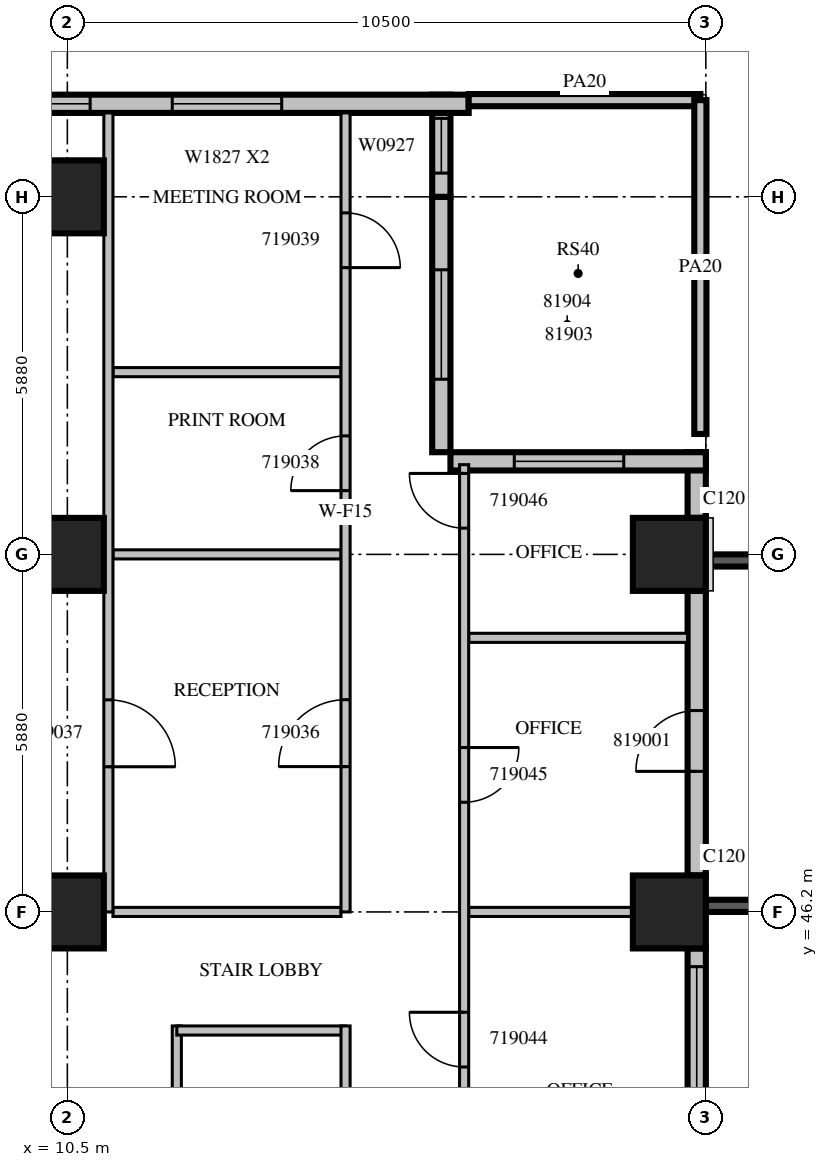
"""IFC4 building model, lengths in metres.
Left out: names, types, materials, properties, quantities, classifications, styles, units other than length and angle.
Written with IfcOpenShell. Run it as: python <this file> out.ifc"""

import sys

from ifc_helpers import new_model, si_unit, direction, frame, frame_2d, origin, origin_2d, place, context, subcontext, project, spatial, rectangle, extrude, source, transform, mapped, element, fill, save


model = new_model("IFC4")
c1 = context("Model", 3, precision=1e-05, world=origin(), true_north=direction((0.0, 1.0)))
c2 = subcontext(c1, "Body", "Model", "MODEL_VIEW")
j1 = project(units=[si_unit("LENGTHUNIT", "METRE"), si_unit("PLANEANGLEUNIT", "RADIAN")], contexts=[c1])
p1 = place(None, origin())
s1 = spatial("IfcSite", under=j1, at=p1, CompositionType="ELEMENT")
p2 = place(p1, origin())
s2 = spatial("IfcBuilding", under=s1, at=p2, CompositionType="ELEMENT")
p3 = place(p2, frame((0.0, 0.0, 90.9)))
s3 = spatial("IfcBuildingStorey", under=s2, at=p3, CompositionType="ELEMENT", Elevation=90.9)
m1 = source(origin(), c2, "Body", "SweptSolid", [
    extrude(rectangle(XDim=1.2, YDim=1.2, at=origin_2d()), origin(), (0.0, 0.0, 1.0), 4.2),
])
for number, where, z_axis, x_axis in (
    (1, (10.5, 46.2, 0.0), (0.0, 0.0, 1.0), (1.0, 0.0, 0.0)),
    (2, (20.4, 46.2, 0.0), (0.0, 0.0, 1.0), (1.0, 0.0, 0.0)),
    (3, (10.5, 52.08, 0.0), (0.0, 0.0, 1.0), (1.0, 0.0, 0.0)),
    (4, (20.4, 52.08, 0.0), (0.0, 0.0, 1.0), (1.0, 0.0, 0.0)),
    (5, (10.5, 57.96, 0.0), (0.0, 0.0, 1.0), (1.0, 0.0, 0.0)),
):
    element("IfcColumn", number, at=place(p3, frame(where, z_axis=z_axis, x_axis=x_axis)), inside=s3, PredefinedType="COLUMN", context=c2, shape_type="MappedRepresentation", body=[
        mapped(m1, transform((0.0, 0.0, 0.0), scale=1.0)),
    ])
m2 = source(origin(), c2, "Body", "SweptSolid", [
    extrude(rectangle(XDim=3.9, YDim=0.2, at=frame_2d((1.95, 0.0))), origin(), (0.0, 0.0, 1.0), 3.8),
])
p4 = place(p3, frame((21.0, 46.3, 0.0), z_axis=(0.0, 0.0, 1.0), x_axis=(1.0, 0.0, 0.0)))
e6 = element("IfcWall", 6, at=p4, inside=s3, PredefinedType="SOLIDWALL", context=c2, shape_type="MappedRepresentation", body=[
    mapped(m2, transform((0.0, 0.0, 0.0), scale=1.0)),
])
m3 = source(origin(), c2, "Body", "SweptSolid", [
    extrude(rectangle(XDim=2.4, YDim=2.7, at=frame_2d((1.2, 1.35))), frame((0.0, 0.11, 0.0), z_axis=(0.0, -1.0, 0.0), x_axis=(1.0, 0.0, 0.0)), (0.0, 0.0, 1.0), 0.22),
])
p5 = place(p4, frame((0.75, 0.0, 0.6)))
e7 = element("IfcOpeningElement", 7, at=p5, cuts=e6, PredefinedType="OPENING", context=c2, shape_type="MappedRepresentation", body=[
    mapped(m3, transform((0.0, 0.0, 0.0), scale=1.0)),
])
p6 = place(p3, frame((21.0, 51.98, 0.0), z_axis=(0.0, 0.0, 1.0), x_axis=(1.0, 0.0, 0.0)))
e8 = element("IfcWall", 8, at=p6, inside=s3, PredefinedType="SOLIDWALL", context=c2, shape_type="MappedRepresentation", body=[
    mapped(m2, transform((0.0, 0.0, 0.0), scale=1.0)),
])
p7 = place(p6, frame((0.75, 0.0, 0.6)))
e9 = element("IfcOpeningElement", 9, at=p7, cuts=e8, PredefinedType="OPENING", context=c2, shape_type="MappedRepresentation", body=[
    mapped(m3, transform((0.0, 0.0, 0.0), scale=1.0)),
])
m4 = source(origin(), c2, "Body", "SweptSolid", [
    extrude(rectangle(XDim=7.2, YDim=0.3, at=frame_2d((3.6, 0.0))), origin(), (0.0, 0.0, 1.0), 3.8),
])
p8 = place(p3, frame((20.85, 38.4, 0.0), z_axis=(0.0, 0.0, 1.0), x_axis=(0.0, 1.0, 0.0)))
e10 = element("IfcWall", 10, at=p8, inside=s3, PredefinedType="STANDARD", context=c2, shape_type="MappedRepresentation", body=[
    mapped(m4, transform((0.0, 0.0, 0.0), scale=1.0)),
])
m5 = source(origin(), c2, "Body", "SweptSolid", [
    extrude(rectangle(XDim=2.4, YDim=2.7, at=frame_2d((1.2, 1.35))), frame((0.0, 0.16, 0.0), z_axis=(0.0, -1.0, 0.0), x_axis=(1.0, 0.0, 0.0)), (0.0, 0.0, 1.0), 0.32),
])
p9 = place(p8, frame((0.3, 0.0, 0.6)))
e11 = element("IfcOpeningElement", 11, at=p9, cuts=e10, PredefinedType="OPENING", context=c2, shape_type="MappedRepresentation", body=[
    mapped(m5, transform((0.0, 0.0, 0.0), scale=1.0)),
])
p10 = place(p8, frame((4.5, 0.0, 0.6)))
e12 = element("IfcOpeningElement", 12, at=p10, cuts=e10, PredefinedType="OPENING", context=c2, shape_type="MappedRepresentation", body=[
    mapped(m5, transform((0.0, 0.0, 0.0), scale=1.0)),
])
m6 = source(origin(), c2, "Body", "SweptSolid", [
    extrude(rectangle(XDim=4.68, YDim=0.3, at=frame_2d((2.34, 0.0))), origin(), (0.0, 0.0, 1.0), 3.8),
])
p11 = place(p3, frame((20.85, 46.8, 0.0), z_axis=(0.0, 0.0, 1.0), x_axis=(0.0, 1.0, 0.0)))
e13 = element("IfcWall", 13, at=p11, inside=s3, PredefinedType="STANDARD", context=c2, shape_type="MappedRepresentation", body=[
    mapped(m6, transform((0.0, 0.0, 0.0), scale=1.0)),
])
m7 = source(origin(), c2, "Body", "SweptSolid", [
    extrude(rectangle(XDim=1.0, YDim=2.1, at=frame_2d((0.5, 1.05))), frame((0.0, 0.16, 0.0), z_axis=(0.0, -1.0, 0.0), x_axis=(1.0, 0.0, 0.0)), (0.0, 0.0, 1.0), 0.32),
])
p12 = place(p11, frame((1.712, 0.0, 0.0)))
e14 = element("IfcOpeningElement", 14, at=p12, cuts=e13, PredefinedType="OPENING", context=c2, shape_type="MappedRepresentation", body=[
    mapped(m7, transform((0.0, 0.0, 0.0), scale=1.0)),
])
m8 = source(origin(), c2, "Body", "SweptSolid", [
    extrude(rectangle(XDim=1.08, YDim=0.3, at=frame_2d((0.54, 0.0))), origin(), (0.0, 0.0, 1.0), 3.8),
])
p13 = place(p3, frame((20.85, 52.68, 0.0), z_axis=(0.0, 0.0, 1.0), x_axis=(0.0, 1.0, 0.0)))
e15 = element("IfcWall", 15, at=p13, inside=s3, PredefinedType="STANDARD", context=c2, shape_type="MappedRepresentation", body=[
    mapped(m8, transform((0.0, 0.0, 0.0), scale=1.0)),
])
m9 = source(origin(), c2, "Body", "SweptSolid", [
    extrude(rectangle(XDim=4.2, YDim=0.3, at=frame_2d((2.1, 0.0))), origin(), (0.0, 0.0, 1.0), 3.8),
])
p14 = place(p3, frame((21.0, 53.61, 0.0), z_axis=(0.0, 0.0, 1.0), x_axis=(-1.0, 0.0, 0.0)))
e16 = element("IfcWall", 16, at=p14, inside=s3, PredefinedType="STANDARD", context=c2, shape_type="MappedRepresentation", body=[
    mapped(m9, transform((0.0, 0.0, 0.0), scale=1.0)),
])
m10 = source(origin(), c2, "Body", "SweptSolid", [
    extrude(rectangle(XDim=1.8, YDim=2.4, at=frame_2d((0.9, 1.2))), frame((0.0, 0.16, 0.0), z_axis=(0.0, -1.0, 0.0), x_axis=(1.0, 0.0, 0.0)), (0.0, 0.0, 1.0), 0.32),
])
p15 = place(p14, frame((1.35, 0.0, 0.0)))
e17 = element("IfcOpeningElement", 17, at=p15, cuts=e16, PredefinedType="OPENING", context=c2, shape_type="MappedRepresentation", body=[
    mapped(m10, transform((0.0, 0.0, 0.0), scale=1.0)),
])
p16 = place(p3, frame((16.65, 53.76, 0.0), z_axis=(0.0, 0.0, 1.0), x_axis=(0.0, 1.0, 0.0)))
e18 = element("IfcWall", 18, at=p16, inside=s3, PredefinedType="STANDARD", context=c2, shape_type="MappedRepresentation", body=[
    mapped(m9, transform((0.0, 0.0, 0.0), scale=1.0)),
])
p17 = place(p16, frame((1.2, 0.0, 0.0)))
e19 = element("IfcOpeningElement", 19, at=p17, cuts=e18, PredefinedType="OPENING", context=c2, shape_type="MappedRepresentation", body=[
    mapped(m10, transform((0.0, 0.0, 0.0), scale=1.0)),
])
m11 = source(origin(), c2, "Body", "SweptSolid", [
    extrude(rectangle(XDim=1.68, YDim=0.3, at=frame_2d((0.84, 0.0))), origin(), (0.0, 0.0, 1.0), 3.8),
])
p18 = place(p3, frame((16.65, 57.96, 0.0), z_axis=(0.0, 0.0, 1.0), x_axis=(0.0, 1.0, 0.0)))
e20 = element("IfcWall", 20, at=p18, inside=s3, PredefinedType="STANDARD", context=c2, shape_type="MappedRepresentation", body=[
    mapped(m11, transform((0.0, 0.0, 0.0), scale=1.0)),
])
m12 = source(origin(), c2, "Body", "SweptSolid", [
    extrude(rectangle(XDim=0.9, YDim=2.7, at=frame_2d((0.45, 1.35))), frame((0.0, 0.16, 0.0), z_axis=(0.0, -1.0, 0.0), x_axis=(1.0, 0.0, 0.0)), (0.0, 0.0, 1.0), 0.32),
])
p19 = place(p18, frame((0.39, 0.0, 0.6)))
e21 = element("IfcOpeningElement", 21, at=p19, cuts=e20, PredefinedType="OPENING", context=c2, shape_type="MappedRepresentation", body=[
    mapped(m12, transform((0.0, 0.0, 0.0), scale=1.0)),
])
m13 = source(origin(), c2, "Body", "SweptSolid", [
    extrude(rectangle(XDim=8.7, YDim=0.3, at=frame_2d((4.35, 0.0))), origin(), (0.0, 0.0, 1.0), 3.8),
])
p20 = place(p3, frame((17.1, 59.49, 0.0), z_axis=(0.0, 0.0, 1.0), x_axis=(-1.0, 0.0, 0.0)))
e22 = element("IfcWall", 22, at=p20, inside=s3, PredefinedType="STANDARD", context=c2, shape_type="MappedRepresentation", body=[
    mapped(m13, transform((0.0, 0.0, 0.0), scale=1.0)),
])
m14 = source(origin(), c2, "Body", "SweptSolid", [
    extrude(rectangle(XDim=1.8, YDim=2.7, at=frame_2d((0.9, 1.35))), frame((0.0, 0.16, 0.0), z_axis=(0.0, -1.0, 0.0), x_axis=(1.0, 0.0, 0.0)), (0.0, 0.0, 1.0), 0.32),
])
p21 = place(p20, frame((3.075, 0.0, 0.6)))
e23 = element("IfcOpeningElement", 23, at=p21, cuts=e22, PredefinedType="OPENING", context=c2, shape_type="MappedRepresentation", body=[
    mapped(m14, transform((0.0, 0.0, 0.0), scale=1.0)),
])
p22 = place(p20, frame((6.225, 0.0, 0.6)))
e24 = element("IfcOpeningElement", 24, at=p22, cuts=e22, PredefinedType="OPENING", context=c2, shape_type="MappedRepresentation", body=[
    mapped(m14, transform((0.0, 0.0, 0.0), scale=1.0)),
])
m15 = source(origin(), c2, "Body", "SweptSolid", [
    extrude(rectangle(XDim=3.81, YDim=0.2, at=frame_2d((1.905, 0.0))), origin(), (0.0, 0.0, 1.0), 1.1),
])
p23 = place(p3, frame((17.1, 59.55, 0.0), z_axis=(0.0, 0.0, 1.0), x_axis=(1.0, 0.0, 0.0)))
e25 = element("IfcWall", 25, at=p23, inside=s3, PredefinedType="PARAPET", context=c2, shape_type="MappedRepresentation", body=[
    mapped(m15, transform((0.0, 0.0, 0.0), scale=1.0)),
])
m16 = source(origin(), c2, "Body", "SweptSolid", [
    extrude(rectangle(XDim=5.49, YDim=0.2, at=frame_2d((2.745, 0.0))), origin(), (0.0, 0.0, 1.0), 1.1),
])
p24 = place(p3, frame((20.91, 59.55, 0.0), z_axis=(0.0, 0.0, 1.0), x_axis=(0.0, -1.0, 0.0)))
e26 = element("IfcWall", 26, at=p24, inside=s3, PredefinedType="PARAPET", context=c2, shape_type="MappedRepresentation", body=[
    mapped(m16, transform((0.0, 0.0, 0.0), scale=1.0)),
])
m17 = source(origin(), c2, "Body", "SweptSolid", [
    extrude(rectangle(XDim=6.45, YDim=0.15, at=frame_2d((3.225, 0.0))), origin(), (0.0, 0.0, 1.0), 3.8),
])
p25 = place(p3, frame((12.3, 44.325, 0.0), z_axis=(0.0, 0.0, 1.0), x_axis=(0.0, -1.0, 0.0)))
e27 = element("IfcWall", 27, at=p25, inside=s3, PredefinedType="PARTITIONING", context=c2, shape_type="MappedRepresentation", body=[
    mapped(m17, transform((0.0, 0.0, 0.0), scale=1.0)),
])
m18 = source(origin(), c2, "Body", "SweptSolid", [
    extrude(rectangle(XDim=2.775, YDim=0.15, at=frame_2d((1.387, 0.0))), origin(), (0.0, 0.0, 1.0), 3.8),
])
p26 = place(p3, frame((15.075, 44.25, 0.0), z_axis=(0.0, 0.0, 1.0), x_axis=(-1.0, 0.0, 0.0)))
e28 = element("IfcWall", 28, at=p26, inside=s3, PredefinedType="PARTITIONING", context=c2, shape_type="MappedRepresentation", body=[
    mapped(m18, transform((0.0, 0.0, 0.0), scale=1.0)),
])
p27 = place(p3, frame((15.075, 37.875, 0.0), z_axis=(0.0, 0.0, 1.0), x_axis=(0.0, 1.0, 0.0)))
e29 = element("IfcWall", 29, at=p27, inside=s3, PredefinedType="PARTITIONING", context=c2, shape_type="MappedRepresentation", body=[
    mapped(m17, transform((0.0, 0.0, 0.0), scale=1.0)),
])
m19 = source(origin(), c2, "Body", "SweptSolid", [
    extrude(rectangle(XDim=0.9, YDim=2.1, at=frame_2d((0.45, 1.05))), frame((0.0, 0.085, 0.0), z_axis=(0.0, -1.0, 0.0), x_axis=(1.0, 0.0, 0.0)), (0.0, 0.0, 1.0), 0.17),
])
p28 = place(p27, frame((2.737, 0.0, 0.0)))
e30 = element("IfcOpeningElement", 30, at=p28, cuts=e29, PredefinedType="OPENING", context=c2, shape_type="MappedRepresentation", body=[
    mapped(m19, transform((0.0, 0.0, 0.0), scale=1.0)),
])
m20 = source(origin(), c2, "Body", "SweptSolid", [
    extrude(rectangle(XDim=3.75, YDim=0.15, at=frame_2d((1.875, 0.0))), origin(), (0.0, 0.0, 1.0), 3.8),
])
for number, where, z_axis, x_axis in (
    (31, (15.0, 52.08, 0.0), (0.0, 0.0, 1.0), (-1.0, 0.0, 0.0)),
    (32, (15.0, 55.077, 0.0), (0.0, 0.0, 1.0), (-1.0, 0.0, 0.0)),
    (33, (15.0, 46.2, 0.0), (0.0, 0.0, 1.0), (-1.0, 0.0, 0.0)),
):
    element("IfcWall", number, at=place(p3, frame(where, z_axis=z_axis, x_axis=x_axis)), inside=s3, PredefinedType="PARTITIONING", context=c2, shape_type="MappedRepresentation", body=[
        mapped(m20, transform((0.0, 0.0, 0.0), scale=1.0)),
    ])
m21 = source(origin(), c2, "Body", "SweptSolid", [
    extrude(rectangle(XDim=13.14, YDim=0.15, at=frame_2d((6.57, 0.0))), origin(), (0.0, 0.0, 1.0), 3.8),
])
p29 = place(p3, frame((11.175, 46.2, 0.0), z_axis=(0.0, 0.0, 1.0), x_axis=(0.0, 1.0, 0.0)))
e34 = element("IfcWall", 34, at=p29, inside=s3, PredefinedType="PARTITIONING", context=c2, shape_type="MappedRepresentation", body=[
    mapped(m21, transform((0.0, 0.0, 0.0), scale=1.0)),
])
m22 = source(origin(), c2, "Body", "SweptSolid", [
    extrude(rectangle(XDim=1.1, YDim=2.1, at=frame_2d((0.55, 1.05))), frame((0.0, 0.085, 0.0), z_axis=(0.0, -1.0, 0.0), x_axis=(1.0, 0.0, 0.0)), (0.0, 0.0, 1.0), 0.17),
])
p30 = place(p29, frame((2.388, 0.0, 0.0)))
e35 = element("IfcOpeningElement", 35, at=p30, cuts=e34, PredefinedType="OPENING", context=c2, shape_type="MappedRepresentation", body=[
    mapped(m22, transform((0.0, 0.0, 0.0), scale=1.0)),
])
m23 = source(origin(), c2, "Body", "SweptSolid", [
    extrude(rectangle(XDim=3.6, YDim=0.15, at=frame_2d((1.8, 0.0))), origin(), (0.0, 0.0, 1.0), 3.8),
])
p31 = place(p3, frame((17.1, 50.708, 0.0), z_axis=(0.0, 0.0, 1.0), x_axis=(1.0, 0.0, 0.0)))
e36 = element("IfcWall", 36, at=p31, inside=s3, PredefinedType="PARTITIONING", context=c2, shape_type="MappedRepresentation", body=[
    mapped(m23, transform((0.0, 0.0, 0.0), scale=1.0)),
])
m24 = source(origin(), c2, "Body", "SweptSolid", [
    extrude(rectangle(XDim=2.701, YDim=0.15, at=frame_2d((1.351, 0.0))), origin(), (0.0, 0.0, 1.0), 3.8),
])
p32 = place(p3, frame((19.801, 46.2, 0.0), z_axis=(0.0, 0.0, 1.0), x_axis=(-1.0, 0.0, 0.0)))
e37 = element("IfcWall", 37, at=p32, inside=s3, PredefinedType="PARTITIONING", context=c2, shape_type="MappedRepresentation", body=[
    mapped(m24, transform((0.0, 0.0, 0.0), scale=1.0)),
])
p33 = place(p3, frame((15.075, 46.2, 0.0), z_axis=(0.0, 0.0, 1.0), x_axis=(0.0, 1.0, 0.0)))
e38 = element("IfcWall", 38, at=p33, inside=s3, PredefinedType="PARTITIONING", context=c2, shape_type="MappedRepresentation", body=[
    mapped(m21, transform((0.0, 0.0, 0.0), scale=1.0)),
])
p34 = place(p33, frame((2.39, 0.0, 0.0)))
e39 = element("IfcOpeningElement", 39, at=p34, cuts=e38, PredefinedType="OPENING", context=c2, shape_type="MappedRepresentation", body=[
    mapped(m22, transform((0.0, 0.0, 0.0), scale=1.0)),
])
p35 = place(p33, frame((6.928, 0.0, 0.0)))
e40 = element("IfcOpeningElement", 40, at=p35, cuts=e38, PredefinedType="OPENING", context=c2, shape_type="MappedRepresentation", body=[
    mapped(m19, transform((0.0, 0.0, 0.0), scale=1.0)),
])
p36 = place(p33, frame((10.596, 0.0, 0.0)))
e41 = element("IfcOpeningElement", 41, at=p36, cuts=e38, PredefinedType="OPENING", context=c2, shape_type="MappedRepresentation", body=[
    mapped(m19, transform((0.0, 0.0, 0.0), scale=1.0)),
])
p37 = place(p3, frame((17.025, 53.555, 0.0), z_axis=(0.0, 0.0, 1.0), x_axis=(0.0, -1.0, 0.0)))
e42 = element("IfcWall", 42, at=p37, inside=s3, PredefinedType="PARTITIONING", context=c2, shape_type="SweptSolid", body=[
    extrude(rectangle(XDim=24.155, YDim=0.15, at=frame_2d((12.078, 0.0))), origin(), (0.0, 0.0, 1.0), 3.8),
])
m25 = source(origin(), c2, "Body", "SweptSolid", [
    extrude(rectangle(XDim=1.0, YDim=2.1, at=frame_2d((0.5, 1.05))), frame((0.0, 0.085, 0.0), z_axis=(0.0, -1.0, 0.0), x_axis=(1.0, 0.0, 0.0)), (0.0, 0.0, 1.0), 0.17),
])
p38 = place(p37, frame((21.798, 0.0, 0.0)))
e43 = element("IfcOpeningElement", 43, at=p38, cuts=e42, PredefinedType="OPENING", context=c2, shape_type="MappedRepresentation", body=[
    mapped(m25, transform((0.0, 0.0, 0.0), scale=1.0)),
])
p39 = place(p37, frame((18.486, 0.0, 0.0)))
e44 = element("IfcOpeningElement", 44, at=p39, cuts=e42, PredefinedType="OPENING", context=c2, shape_type="MappedRepresentation", body=[
    mapped(m25, transform((0.0, 0.0, 0.0), scale=1.0)),
])
p40 = place(p37, frame((16.143, 0.0, 0.0)))
e45 = element("IfcOpeningElement", 45, at=p40, cuts=e42, PredefinedType="OPENING", context=c2, shape_type="MappedRepresentation", body=[
    mapped(m25, transform((0.0, 0.0, 0.0), scale=1.0)),
])
p41 = place(p37, frame((13.205, 0.0, 0.0)))
e46 = element("IfcOpeningElement", 46, at=p41, cuts=e42, PredefinedType="OPENING", context=c2, shape_type="MappedRepresentation", body=[
    mapped(m19, transform((0.0, 0.0, 0.0), scale=1.0)),
])
p42 = place(p37, frame((9.005, 0.0, 0.0)))
e47 = element("IfcOpeningElement", 47, at=p42, cuts=e42, PredefinedType="OPENING", context=c2, shape_type="MappedRepresentation", body=[
    mapped(m19, transform((0.0, 0.0, 0.0), scale=1.0)),
])
p43 = place(p37, frame((4.651, 0.0, 0.0)))
e48 = element("IfcOpeningElement", 48, at=p43, cuts=e42, PredefinedType="OPENING", context=c2, shape_type="MappedRepresentation", body=[
    mapped(m19, transform((0.0, 0.0, 0.0), scale=1.0)),
])
p44 = place(p37, frame((0.144, 0.0, 0.0)))
e49 = element("IfcOpeningElement", 49, at=p44, cuts=e42, PredefinedType="OPENING", context=c2, shape_type="MappedRepresentation", body=[
    mapped(m19, transform((0.0, 0.0, 0.0), scale=1.0)),
])
m26 = source(origin(), c2, "Body", "SweptSolid", [
    extrude(rectangle(XDim=2.4, YDim=2.7, at=frame_2d((1.2, 1.35))), frame((0.0, 0.03, 0.0), z_axis=(0.0, -1.0, 0.0), x_axis=(1.0, 0.0, 0.0)), (0.0, 0.0, 1.0), 0.06),
])
p45 = place(p10, origin())
e50 = element("IfcWindow", 50, at=p45, inside=s3, PartitioningType="SINGLE_PANEL", PredefinedType="WINDOW", context=c2, shape_type="MappedRepresentation", body=[
    mapped(m26, transform((0.0, 0.0, 0.0), scale=1.0)),
])
fill(e12, e50)
m27 = source(origin(), c2, "Body", "SweptSolid", [
    extrude(rectangle(XDim=1.8, YDim=2.4, at=frame_2d((0.9, 1.2))), frame((0.0, 0.025, 0.0), z_axis=(0.0, -1.0, 0.0), x_axis=(1.0, 0.0, 0.0)), (0.0, 0.0, 1.0), 0.05),
])
p46 = place(p15, origin())
e51 = element("IfcDoor", 51, at=p46, inside=s3, OperationType="SLIDING_TO_LEFT", PredefinedType="DOOR", context=c2, shape_type="MappedRepresentation", body=[
    mapped(m27, transform((0.0, 0.0, 0.0), scale=1.0)),
])
fill(e17, e51)
p47 = place(p17, origin())
e52 = element("IfcDoor", 52, at=p47, inside=s3, OperationType="SLIDING_TO_LEFT", PredefinedType="DOOR", context=c2, shape_type="MappedRepresentation", body=[
    mapped(m27, transform((0.0, 0.0, 0.0), scale=1.0)),
])
fill(e19, e52)
m28 = source(origin(), c2, "Body", "SweptSolid", [
    extrude(rectangle(XDim=0.9, YDim=2.7, at=frame_2d((0.45, 1.35))), frame((0.0, 0.03, 0.0), z_axis=(0.0, -1.0, 0.0), x_axis=(1.0, 0.0, 0.0)), (0.0, 0.0, 1.0), 0.06),
])
p48 = place(p19, origin())
e53 = element("IfcWindow", 53, at=p48, inside=s3, PartitioningType="SINGLE_PANEL", PredefinedType="WINDOW", context=c2, shape_type="MappedRepresentation", body=[
    mapped(m28, transform((0.0, 0.0, 0.0), scale=1.0)),
])
fill(e21, e53)
m29 = source(origin(), c2, "Body", "SweptSolid", [
    extrude(rectangle(XDim=1.8, YDim=2.7, at=frame_2d((0.9, 1.35))), frame((0.0, 0.03, 0.0), z_axis=(0.0, -1.0, 0.0), x_axis=(1.0, 0.0, 0.0)), (0.0, 0.0, 1.0), 0.06),
])
p49 = place(p21, origin())
e54 = element("IfcWindow", 54, at=p49, inside=s3, PartitioningType="SINGLE_PANEL", PredefinedType="WINDOW", context=c2, shape_type="MappedRepresentation", body=[
    mapped(m29, transform((0.0, 0.0, 0.0), scale=1.0)),
])
fill(e23, e54)
p50 = place(p22, origin())
e55 = element("IfcWindow", 55, at=p50, inside=s3, PartitioningType="SINGLE_PANEL", PredefinedType="WINDOW", context=c2, shape_type="MappedRepresentation", body=[
    mapped(m29, transform((0.0, 0.0, 0.0), scale=1.0)),
])
fill(e24, e55)
m30 = source(origin(), c2, "Body", "SweptSolid", [
    extrude(rectangle(XDim=1.1, YDim=2.1, at=frame_2d((0.55, 1.05))), frame((0.0, 0.025, 0.0), z_axis=(0.0, -1.0, 0.0), x_axis=(1.0, 0.0, 0.0)), (0.0, 0.0, 1.0), 0.05),
])
p51 = place(p34, origin())
e56 = element("IfcDoor", 56, at=p51, inside=s3, OperationType="SINGLE_SWING_LEFT", PredefinedType="DOOR", context=c2, shape_type="MappedRepresentation", body=[
    mapped(m30, transform((0.0, 0.0, 0.0), scale=1.0)),
])
fill(e39, e56)
p52 = place(p30, origin())
e57 = element("IfcDoor", 57, at=p52, inside=s3, OperationType="SINGLE_SWING_RIGHT", PredefinedType="DOOR", context=c2, shape_type="MappedRepresentation", body=[
    mapped(m30, transform((0.0, 0.0, 0.0), scale=1.0)),
])
fill(e35, e57)
m31 = source(origin(), c2, "Body", "SweptSolid", [
    extrude(rectangle(XDim=0.9, YDim=2.1, at=frame_2d((0.45, 1.05))), frame((0.0, 0.025, 0.0), z_axis=(0.0, -1.0, 0.0), x_axis=(1.0, 0.0, 0.0)), (0.0, 0.0, 1.0), 0.05),
])
p53 = place(p35, origin())
e58 = element("IfcDoor", 58, at=p53, inside=s3, OperationType="SINGLE_SWING_LEFT", PredefinedType="DOOR", context=c2, shape_type="MappedRepresentation", body=[
    mapped(m31, transform((0.0, 0.0, 0.0), scale=1.0)),
])
fill(e40, e58)
p54 = place(p36, origin())
e59 = element("IfcDoor", 59, at=p54, inside=s3, OperationType="SINGLE_SWING_RIGHT", PredefinedType="DOOR", context=c2, shape_type="MappedRepresentation", body=[
    mapped(m31, transform((0.0, 0.0, 0.0), scale=1.0)),
])
fill(e41, e59)
p55 = place(p42, origin())
e60 = element("IfcDoor", 60, at=p55, inside=s3, OperationType="SINGLE_SWING_RIGHT", PredefinedType="DOOR", context=c2, shape_type="MappedRepresentation", body=[
    mapped(m31, transform((0.0, 0.0, 0.0), scale=1.0)),
])
fill(e47, e60)
p56 = place(p43, origin())
e61 = element("IfcDoor", 61, at=p56, inside=s3, OperationType="SINGLE_SWING_LEFT", PredefinedType="DOOR", context=c2, shape_type="MappedRepresentation", body=[
    mapped(m31, transform((0.0, 0.0, 0.0), scale=1.0)),
])
fill(e48, e61)
p57 = place(p44, origin())
e62 = element("IfcDoor", 62, at=p57, inside=s3, OperationType="SINGLE_SWING_RIGHT", PredefinedType="DOOR", context=c2, shape_type="MappedRepresentation", body=[
    mapped(m31, transform((0.0, 0.0, 0.0), scale=1.0)),
])
fill(e49, e62)
m32 = source(origin(), c2, "Body", "SweptSolid", [
    extrude(rectangle(XDim=1.0, YDim=2.1, at=frame_2d((0.5, 1.05))), frame((0.0, 0.025, 0.0), z_axis=(0.0, -1.0, 0.0), x_axis=(1.0, 0.0, 0.0)), (0.0, 0.0, 1.0), 0.05),
])
p58 = place(p12, origin())
e63 = element("IfcDoor", 63, at=p58, inside=s3, OperationType="SINGLE_SWING_LEFT", PredefinedType="DOOR", context=c2, shape_type="MappedRepresentation", body=[
    mapped(m32, transform((0.0, 0.0, 0.0), scale=1.0)),
])
fill(e14, e63)
save(model, sys.argv[1])
